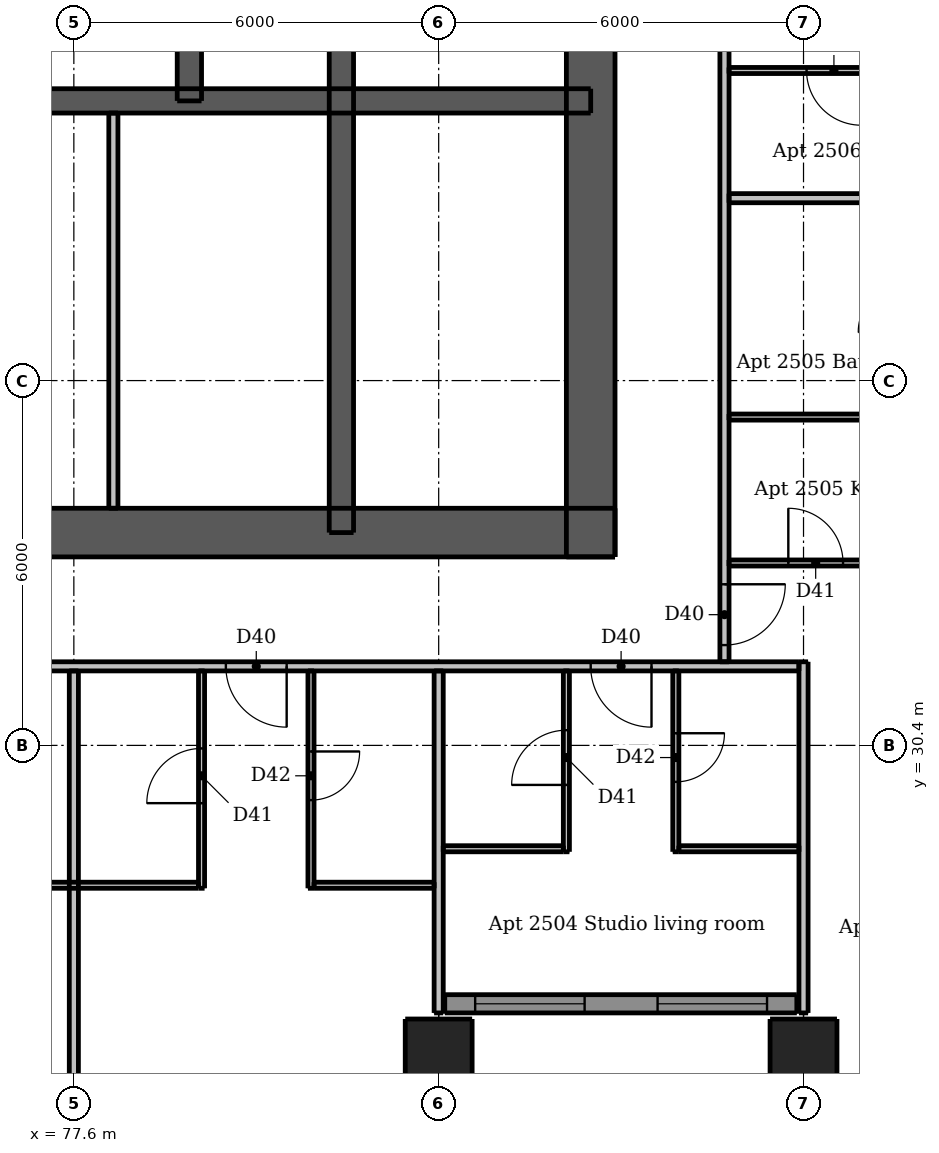
"""IFC4 building model, lengths in metres.
Left out: names, types, materials, properties, quantities, classifications, styles, units other than length and angle.
Written with IfcOpenShell. Run it as: python <this file> out.ifc"""

import sys

from ifc_helpers import new_model, si_unit, direction, frame, frame_2d, origin, origin_2d, place, context, subcontext, project, spatial, rectangle, extrude, element, fill, save


model = new_model("IFC4")
c1 = context("Model", 3, precision=1e-05, world=origin(), true_north=direction((0.0, 1.0)))
c2 = subcontext(c1, "Body", "Model", "MODEL_VIEW")
j1 = project(units=[si_unit("LENGTHUNIT", "METRE"), si_unit("PLANEANGLEUNIT", "RADIAN")], contexts=[c1])
p1 = place(None, origin())
s1 = spatial("IfcSite", under=j1, at=p1, CompositionType="ELEMENT")
p2 = place(p1, origin())
s2 = spatial("IfcBuilding", under=s1, at=p2, CompositionType="ELEMENT")
p3 = place(p2, frame((0.0, 0.0, 95.2)))
s3 = spatial("IfcBuildingStorey", under=s2, at=p3, CompositionType="ELEMENT", Elevation=95.2)
p4 = place(p3, frame((62.5, 33.9, 0.0), z_axis=(0.0, 0.0, 1.0), x_axis=(1.0, 0.0, 0.0)))
e1 = element("IfcWall", 1, at=p4, inside=s3, PredefinedType="SHEAR", context=c2, shape_type="SweptSolid", body=[
    extrude(rectangle(XDim=24.0, YDim=0.8, at=frame_2d((12.0, 0.0))), origin(), (0.0, 0.0, 1.0), 3.05),
])
p5 = place(p4, frame((2.0, 0.0, 0.0)))
e2 = element("IfcOpeningElement", 2, at=p5, cuts=e1, PredefinedType="OPENING", context=c2, shape_type="SweptSolid", body=[
    extrude(rectangle(XDim=1.1, YDim=2.1, at=frame_2d((0.55, 1.05))), frame((0.0, 0.41, 0.0), z_axis=(0.0, -1.0, 0.0), x_axis=(1.0, 0.0, 0.0)), (0.0, 0.0, 1.0), 0.82),
])
p6 = place(p4, frame((20.9, 0.0, 0.0)))
e3 = element("IfcOpeningElement", 3, at=p6, cuts=e1, PredefinedType="OPENING", context=c2, shape_type="SweptSolid", body=[
    extrude(rectangle(XDim=1.1, YDim=2.1, at=frame_2d((0.55, 1.05))), frame((0.0, 0.41, 0.0), z_axis=(0.0, -1.0, 0.0), x_axis=(1.0, 0.0, 0.0)), (0.0, 0.0, 1.0), 0.82),
])
p7 = place(p4, frame((8.0, 0.0, 0.0)))
e4 = element("IfcOpeningElement", 4, at=p7, cuts=e1, PredefinedType="OPENING", context=c2, shape_type="SweptSolid", body=[
    extrude(rectangle(XDim=1.1, YDim=2.1, at=frame_2d((0.55, 1.05))), frame((0.0, 0.41, 0.0), z_axis=(0.0, -1.0, 0.0), x_axis=(1.0, 0.0, 0.0)), (0.0, 0.0, 1.0), 0.82),
])
p8 = place(p4, frame((13.525, 0.0, 0.0)))
e5 = element("IfcOpeningElement", 5, at=p8, cuts=e1, PredefinedType="OPENING", context=c2, shape_type="SweptSolid", body=[
    extrude(rectangle(XDim=0.9, YDim=2.1, at=frame_2d((0.45, 1.05))), frame((0.0, 0.41, 0.0), z_axis=(0.0, -1.0, 0.0), x_axis=(1.0, 0.0, 0.0)), (0.0, 0.0, 1.0), 0.82),
])
p9 = place(p4, frame((17.075, 0.0, 0.0)))
e6 = element("IfcOpeningElement", 6, at=p9, cuts=e1, PredefinedType="OPENING", context=c2, shape_type="SweptSolid", body=[
    extrude(rectangle(XDim=0.9, YDim=2.1, at=frame_2d((0.45, 1.05))), frame((0.0, 0.41, 0.0), z_axis=(0.0, -1.0, 0.0), x_axis=(1.0, 0.0, 0.0)), (0.0, 0.0, 1.0), 0.82),
])
p10 = place(p3, frame((86.1, 33.5, 0.0), z_axis=(0.0, 0.0, 1.0), x_axis=(0.0, 1.0, 0.0)))
e7 = element("IfcWall", 7, at=p10, inside=s3, PredefinedType="SHEAR", context=c2, shape_type="SweptSolid", body=[
    extrude(rectangle(XDim=24.0, YDim=0.8, at=frame_2d((12.0, 0.0))), origin(), (0.0, 0.0, 1.0), 3.05),
])
p11 = place(p10, frame((11.2, 0.0, 0.0)))
e8 = element("IfcOpeningElement", 8, at=p11, cuts=e7, PredefinedType="OPENING", context=c2, shape_type="SweptSolid", body=[
    extrude(rectangle(XDim=1.6, YDim=2.1, at=frame_2d((0.8, 1.05))), frame((0.0, 0.41, 0.0), z_axis=(0.0, -1.0, 0.0), x_axis=(1.0, 0.0, 0.0)), (0.0, 0.0, 1.0), 0.82),
])
p12 = place(p3, frame((62.9, 41.0, 0.0), z_axis=(0.0, 0.0, 1.0), x_axis=(1.0, 0.0, 0.0)))
e9 = element("IfcWall", 9, at=p12, inside=s3, PredefinedType="SHEAR", context=c2, shape_type="SweptSolid", body=[
    extrude(rectangle(XDim=23.2, YDim=0.4, at=frame_2d((11.6, 0.0))), origin(), (0.0, 0.0, 1.0), 3.05),
])
p13 = place(p3, frame((82.0, 33.9, 0.0), z_axis=(0.0, 0.0, 1.0), x_axis=(0.0, 1.0, 0.0)))
e10 = element("IfcWall", 10, at=p13, inside=s3, PredefinedType="SHEAR", context=c2, shape_type="SweptSolid", body=[
    extrude(rectangle(XDim=10.0, YDim=0.4, at=frame_2d((5.0, 0.0))), origin(), (0.0, 0.0, 1.0), 3.05),
])
p14 = place(p3, frame((79.5, 41.0, 0.0), z_axis=(0.0, 0.0, 1.0), x_axis=(0.0, 1.0, 0.0)))
e11 = element("IfcWall", 11, at=p14, inside=s3, PredefinedType="SHEAR", context=c2, shape_type="SweptSolid", body=[
    extrude(rectangle(XDim=2.9, YDim=0.4, at=frame_2d((1.45, 0.0))), origin(), (0.0, 0.0, 1.0), 3.05),
])
for number, where, z_axis, x_axis in (
    (12, (83.6, 25.35, 0.0), (0.0, 0.0, 1.0), (1.0, 0.0, 0.0)),
    (13, (89.6, 25.35, 0.0), (0.0, 0.0, 1.0), (1.0, 0.0, 0.0)),
):
    element("IfcColumn", number, at=place(p3, frame(where, z_axis=z_axis, x_axis=x_axis)), inside=s3, PredefinedType="COLUMN", context=c2, shape_type="SweptSolid", body=[
        extrude(rectangle(XDim=1.1, YDim=1.1, at=origin_2d()), origin(), (0.0, 0.0, 1.0), 3.05),
    ])
p15 = place(p3, frame((83.7, 26.15, 0.0), z_axis=(0.0, 0.0, 1.0), x_axis=(1.0, 0.0, 0.0)))
e14 = element("IfcWall", 14, at=p15, inside=s3, PredefinedType="SOLIDWALL", context=c2, shape_type="SweptSolid", body=[
    extrude(rectangle(XDim=5.79, YDim=0.3, at=frame_2d((2.895, 0.0))), origin(), (0.0, 0.0, 1.0), 3.05),
])
p16 = place(p15, frame((0.5, 0.0, 0.15)))
e15 = element("IfcOpeningElement", 15, at=p16, cuts=e14, PredefinedType="OPENING", context=c2, shape_type="SweptSolid", body=[
    extrude(rectangle(XDim=1.8, YDim=2.1, at=frame_2d((0.9, 1.05))), frame((0.0, 0.16, 0.0), z_axis=(0.0, -1.0, 0.0), x_axis=(1.0, 0.0, 0.0)), (0.0, 0.0, 1.0), 0.32),
])
p17 = place(p15, frame((3.5, 0.0, 0.15)))
e16 = element("IfcOpeningElement", 16, at=p17, cuts=e14, PredefinedType="OPENING", context=c2, shape_type="SweptSolid", body=[
    extrude(rectangle(XDim=1.8, YDim=2.1, at=frame_2d((0.9, 1.05))), frame((0.0, 0.16, 0.0), z_axis=(0.0, -1.0, 0.0), x_axis=(1.0, 0.0, 0.0)), (0.0, 0.0, 1.0), 0.32),
])
p18 = place(p3, frame((78.25, 34.3, 0.0), z_axis=(0.0, 0.0, 1.0), x_axis=(0.0, 1.0, 0.0)))
e17 = element("IfcWall", 17, at=p18, inside=s3, PredefinedType="PLUMBINGWALL", context=c2, shape_type="SweptSolid", body=[
    extrude(rectangle(XDim=6.5, YDim=0.15, at=frame_2d((3.25, 0.0))), origin(), (0.0, 0.0, 1.0), 3.05),
])
p19 = place(p3, frame((79.7, 28.05, 0.0), z_axis=(0.0, 0.0, 1.0), x_axis=(0.0, 1.0, 0.0)))
e18 = element("IfcWall", 18, at=p19, inside=s3, PredefinedType="PARTITIONING", context=c2, shape_type="SweptSolid", body=[
    extrude(rectangle(XDim=3.575, YDim=0.1, at=frame_2d((1.788, 0.0))), origin(), (0.0, 0.0, 1.0), 3.05),
])
p20 = place(p19, frame((1.4, 0.0, 0.0)))
e19 = element("IfcOpeningElement", 19, at=p20, cuts=e18, PredefinedType="OPENING", context=c2, shape_type="SweptSolid", body=[
    extrude(rectangle(XDim=0.9, YDim=2.1, at=frame_2d((0.45, 1.05))), frame((0.0, 0.06, 0.0), z_axis=(0.0, -1.0, 0.0), x_axis=(1.0, 0.0, 0.0)), (0.0, 0.0, 1.0), 0.12),
])
p21 = place(p3, frame((81.5, 31.625, 0.0), z_axis=(0.0, 0.0, 1.0), x_axis=(0.0, -1.0, 0.0)))
e20 = element("IfcWall", 20, at=p21, inside=s3, PredefinedType="PARTITIONING", context=c2, shape_type="SweptSolid", body=[
    extrude(rectangle(XDim=3.575, YDim=0.1, at=frame_2d((1.788, 0.0))), origin(), (0.0, 0.0, 1.0), 3.05),
])
p22 = place(p21, frame((1.325, 0.0, 0.0)))
e21 = element("IfcOpeningElement", 21, at=p22, cuts=e20, PredefinedType="OPENING", context=c2, shape_type="SweptSolid", body=[
    extrude(rectangle(XDim=0.8, YDim=2.1, at=frame_2d((0.4, 1.05))), frame((0.0, 0.06, 0.0), z_axis=(0.0, -1.0, 0.0), x_axis=(1.0, 0.0, 0.0)), (0.0, 0.0, 1.0), 0.12),
])
p23 = place(p3, frame((85.7, 28.65, 0.0), z_axis=(0.0, 0.0, 1.0), x_axis=(0.0, 1.0, 0.0)))
e22 = element("IfcWall", 22, at=p23, inside=s3, PredefinedType="PARTITIONING", context=c2, shape_type="SweptSolid", body=[
    extrude(rectangle(XDim=2.975, YDim=0.1, at=frame_2d((1.488, 0.0))), origin(), (0.0, 0.0, 1.0), 3.05),
])
p24 = place(p23, frame((1.1, 0.0, 0.0)))
e23 = element("IfcOpeningElement", 23, at=p24, cuts=e22, PredefinedType="OPENING", context=c2, shape_type="SweptSolid", body=[
    extrude(rectangle(XDim=0.9, YDim=2.1, at=frame_2d((0.45, 1.05))), frame((0.0, 0.06, 0.0), z_axis=(0.0, -1.0, 0.0), x_axis=(1.0, 0.0, 0.0)), (0.0, 0.0, 1.0), 0.12),
])
p25 = place(p3, frame((87.5, 31.625, 0.0), z_axis=(0.0, 0.0, 1.0), x_axis=(0.0, -1.0, 0.0)))
e24 = element("IfcWall", 24, at=p25, inside=s3, PredefinedType="PARTITIONING", context=c2, shape_type="SweptSolid", body=[
    extrude(rectangle(XDim=2.975, YDim=0.1, at=frame_2d((1.488, 0.0))), origin(), (0.0, 0.0, 1.0), 3.05),
])
p26 = place(p25, frame((1.025, 0.0, 0.0)))
e25 = element("IfcOpeningElement", 25, at=p26, cuts=e24, PredefinedType="OPENING", context=c2, shape_type="SweptSolid", body=[
    extrude(rectangle(XDim=0.8, YDim=2.1, at=frame_2d((0.4, 1.05))), frame((0.0, 0.06, 0.0), z_axis=(0.0, -1.0, 0.0), x_axis=(1.0, 0.0, 0.0)), (0.0, 0.0, 1.0), 0.12),
])
p27 = place(p3, frame((91.85, 41.5, 0.0), z_axis=(0.0, 0.0, 1.0), x_axis=(-1.0, 0.0, 0.0)))
e26 = element("IfcWall", 26, at=p27, inside=s3, PredefinedType="PARTITIONING", context=c2, shape_type="SweptSolid", body=[
    extrude(rectangle(XDim=3.475, YDim=0.1, at=frame_2d((1.738, 0.0))), origin(), (0.0, 0.0, 1.0), 3.05),
])
p28 = place(p27, frame((1.3, 0.0, 0.0)))
e27 = element("IfcOpeningElement", 27, at=p28, cuts=e26, PredefinedType="OPENING", context=c2, shape_type="SweptSolid", body=[
    extrude(rectangle(XDim=0.9, YDim=2.1, at=frame_2d((0.45, 1.05))), frame((0.0, 0.06, 0.0), z_axis=(0.0, -1.0, 0.0), x_axis=(1.0, 0.0, 0.0)), (0.0, 0.0, 1.0), 0.12),
])
p29 = place(p3, frame((88.375, 35.8, 0.0), z_axis=(0.0, 0.0, 1.0), x_axis=(1.0, 0.0, 0.0)))
e28 = element("IfcWall", 28, at=p29, inside=s3, PredefinedType="PARTITIONING", context=c2, shape_type="SweptSolid", body=[
    extrude(rectangle(XDim=2.875, YDim=0.1, at=frame_2d((1.438, 0.0))), origin(), (0.0, 0.0, 1.0), 3.05),
])
p30 = place(p3, frame((88.375, 33.4, 0.0), z_axis=(0.0, 0.0, 1.0), x_axis=(1.0, 0.0, 0.0)))
e29 = element("IfcWall", 29, at=p30, inside=s3, PredefinedType="PARTITIONING", context=c2, shape_type="SweptSolid", body=[
    extrude(rectangle(XDim=5.625, YDim=0.1, at=frame_2d((2.812, 0.0))), origin(), (0.0, 0.0, 1.0), 3.05),
])
p31 = place(p30, frame((0.975, 0.0, 0.0)))
e30 = element("IfcOpeningElement", 30, at=p31, cuts=e29, PredefinedType="OPENING", context=c2, shape_type="SweptSolid", body=[
    extrude(rectangle(XDim=0.9, YDim=2.1, at=frame_2d((0.45, 1.05))), frame((0.0, 0.06, 0.0), z_axis=(0.0, -1.0, 0.0), x_axis=(1.0, 0.0, 0.0)), (0.0, 0.0, 1.0), 0.12),
])
p32 = place(p30, frame((3.825, 0.0, 0.0)))
e31 = element("IfcOpeningElement", 31, at=p32, cuts=e29, PredefinedType="OPENING", context=c2, shape_type="SweptSolid", body=[
    extrude(rectangle(XDim=0.9, YDim=2.1, at=frame_2d((0.45, 1.05))), frame((0.0, 0.06, 0.0), z_axis=(0.0, -1.0, 0.0), x_axis=(1.0, 0.0, 0.0)), (0.0, 0.0, 1.0), 0.12),
])
for number, where, z_axis, x_axis in (
    (32, (83.675, 28.7, 0.0), (0.0, 0.0, 1.0), (1.0, 0.0, 0.0)),
    (33, (87.55, 28.7, 0.0), (0.0, 0.0, 1.0), (1.0, 0.0, 0.0)),
):
    element("IfcWall", number, at=place(p3, frame(where, z_axis=z_axis, x_axis=x_axis)), inside=s3, PredefinedType="PARTITIONING", context=c2, shape_type="SweptSolid", body=[
        extrude(rectangle(XDim=1.975, YDim=0.1, at=frame_2d((0.987, 0.0))), origin(), (0.0, 0.0, 1.0), 3.05),
    ])
p33 = place(p3, frame((75.55, 28.1, 0.0), z_axis=(0.0, 0.0, 1.0), x_axis=(1.0, 0.0, 0.0)))
e34 = element("IfcWall", 34, at=p33, inside=s3, PredefinedType="PARTITIONING", context=c2, shape_type="SweptSolid", body=[
    extrude(rectangle(XDim=4.1, YDim=0.1, at=frame_2d((2.05, 0.0))), origin(), (0.0, 0.0, 1.0), 3.05),
])
p34 = place(p3, frame((81.55, 28.1, 0.0), z_axis=(0.0, 0.0, 1.0), x_axis=(1.0, 0.0, 0.0)))
e35 = element("IfcWall", 35, at=p34, inside=s3, PredefinedType="PARTITIONING", context=c2, shape_type="SweptSolid", body=[
    extrude(rectangle(XDim=1.975, YDim=0.1, at=frame_2d((0.987, 0.0))), origin(), (0.0, 0.0, 1.0), 3.05),
])
p35 = place(p3, frame((77.6, 23.0, 0.0), z_axis=(0.0, 0.0, 1.0), x_axis=(0.0, 1.0, 0.0)))
e36 = element("IfcWall", 36, at=p35, inside=s3, PredefinedType="PARTITIONING", context=c2, shape_type="SweptSolid", body=[
    extrude(rectangle(XDim=8.625, YDim=0.15, at=frame_2d((4.312, 0.0))), origin(), (0.0, 0.0, 1.0), 2.516),
])
p36 = place(p3, frame((83.6, 26.0, 0.0), z_axis=(0.0, 0.0, 1.0), x_axis=(0.0, 1.0, 0.0)))
e37 = element("IfcWall", 37, at=p36, inside=s3, PredefinedType="PARTITIONING", context=c2, shape_type="SweptSolid", body=[
    extrude(rectangle(XDim=5.625, YDim=0.15, at=frame_2d((2.812, 0.0))), origin(), (0.0, 0.0, 1.0), 2.589),
])
p37 = place(p3, frame((88.3, 60.475, 0.0), z_axis=(0.0, 0.0, 1.0), x_axis=(0.0, -1.0, 0.0)))
e38 = element("IfcWall", 38, at=p37, inside=s3, PredefinedType="PARTITIONING", context=c2, shape_type="SweptSolid", body=[
    extrude(rectangle(XDim=28.7, YDim=0.15, at=frame_2d((14.35, 0.0))), origin(), (0.0, 0.0, 1.0), 3.05),
])
p38 = place(p37, frame((27.425, 0.0, 0.0)))
e39 = element("IfcOpeningElement", 39, at=p38, cuts=e38, PredefinedType="OPENING", context=c2, shape_type="SweptSolid", body=[
    extrude(rectangle(XDim=1.0, YDim=2.1, at=frame_2d((0.5, 1.05))), frame((0.0, 0.085, 0.0), z_axis=(0.0, -1.0, 0.0), x_axis=(1.0, 0.0, 0.0)), (0.0, 0.0, 1.0), 0.17),
])
p39 = place(p37, frame((17.575, 0.0, 0.0)))
e40 = element("IfcOpeningElement", 40, at=p39, cuts=e38, PredefinedType="OPENING", context=c2, shape_type="SweptSolid", body=[
    extrude(rectangle(XDim=1.0, YDim=2.1, at=frame_2d((0.5, 1.05))), frame((0.0, 0.085, 0.0), z_axis=(0.0, -1.0, 0.0), x_axis=(1.0, 0.0, 0.0)), (0.0, 0.0, 1.0), 0.17),
])
p40 = place(p37, frame((11.575, 0.0, 0.0)))
e41 = element("IfcOpeningElement", 41, at=p40, cuts=e38, PredefinedType="OPENING", context=c2, shape_type="SweptSolid", body=[
    extrude(rectangle(XDim=1.0, YDim=2.1, at=frame_2d((0.5, 1.05))), frame((0.0, 0.085, 0.0), z_axis=(0.0, -1.0, 0.0), x_axis=(1.0, 0.0, 0.0)), (0.0, 0.0, 1.0), 0.17),
])
p41 = place(p37, frame((3.775, 0.0, 0.0)))
e42 = element("IfcOpeningElement", 42, at=p41, cuts=e38, PredefinedType="OPENING", context=c2, shape_type="SweptSolid", body=[
    extrude(rectangle(XDim=1.0, YDim=2.1, at=frame_2d((0.5, 1.05))), frame((0.0, 0.085, 0.0), z_axis=(0.0, -1.0, 0.0), x_axis=(1.0, 0.0, 0.0)), (0.0, 0.0, 1.0), 0.17),
])
p42 = place(p3, frame((89.6, 26.0, 0.0), z_axis=(0.0, 0.0, 1.0), x_axis=(0.0, 1.0, 0.0)))
e43 = element("IfcWall", 43, at=p42, inside=s3, PredefinedType="PARTITIONING", context=c2, shape_type="SweptSolid", body=[
    extrude(rectangle(XDim=5.775, YDim=0.15, at=frame_2d((2.887, 0.0))), origin(), (0.0, 0.0, 1.0), 2.516),
])
p43 = place(p3, frame((88.375, 39.4, 0.0), z_axis=(0.0, 0.0, 1.0), x_axis=(1.0, 0.0, 0.0)))
e44 = element("IfcWall", 44, at=p43, inside=s3, PredefinedType="PARTITIONING", context=c2, shape_type="SweptSolid", body=[
    extrude(rectangle(XDim=10.125, YDim=0.15, at=frame_2d((5.062, 0.0))), origin(), (0.0, 0.0, 1.0), 3.05),
])
p44 = place(p3, frame((89.525, 31.7, 0.0), z_axis=(0.0, 0.0, 1.0), x_axis=(-1.0, 0.0, 0.0)))
e45 = element("IfcWall", 45, at=p44, inside=s3, PredefinedType="PARTITIONING", context=c2, shape_type="SweptSolid", body=[
    extrude(rectangle(XDim=28.75, YDim=0.15, at=frame_2d((14.375, 0.0))), origin(), (0.0, 0.0, 1.0), 3.05),
])
p45 = place(p44, frame((25.875, 0.0, 0.0)))
e46 = element("IfcOpeningElement", 46, at=p45, cuts=e45, PredefinedType="OPENING", context=c2, shape_type="SweptSolid", body=[
    extrude(rectangle(XDim=1.0, YDim=2.1, at=frame_2d((0.5, 1.05))), frame((0.0, 0.085, 0.0), z_axis=(0.0, -1.0, 0.0), x_axis=(1.0, 0.0, 0.0)), (0.0, 0.0, 1.0), 0.17),
])
p46 = place(p44, frame((14.425, 0.0, 0.0)))
e47 = element("IfcOpeningElement", 47, at=p46, cuts=e45, PredefinedType="OPENING", context=c2, shape_type="SweptSolid", body=[
    extrude(rectangle(XDim=1.0, YDim=2.1, at=frame_2d((0.5, 1.05))), frame((0.0, 0.085, 0.0), z_axis=(0.0, -1.0, 0.0), x_axis=(1.0, 0.0, 0.0)), (0.0, 0.0, 1.0), 0.17),
])
p47 = place(p44, frame((8.425, 0.0, 0.0)))
e48 = element("IfcOpeningElement", 48, at=p47, cuts=e45, PredefinedType="OPENING", context=c2, shape_type="SweptSolid", body=[
    extrude(rectangle(XDim=1.0, YDim=2.1, at=frame_2d((0.5, 1.05))), frame((0.0, 0.085, 0.0), z_axis=(0.0, -1.0, 0.0), x_axis=(1.0, 0.0, 0.0)), (0.0, 0.0, 1.0), 0.17),
])
p48 = place(p44, frame((2.425, 0.0, 0.0)))
e49 = element("IfcOpeningElement", 49, at=p48, cuts=e45, PredefinedType="OPENING", context=c2, shape_type="SweptSolid", body=[
    extrude(rectangle(XDim=1.0, YDim=2.1, at=frame_2d((0.5, 1.05))), frame((0.0, 0.085, 0.0), z_axis=(0.0, -1.0, 0.0), x_axis=(1.0, 0.0, 0.0)), (0.0, 0.0, 1.0), 0.17),
])
p49 = place(p16, origin())
e50 = element("IfcWindow", 50, at=p49, inside=s3, PartitioningType="DOUBLE_PANEL_VERTICAL", PredefinedType="WINDOW", context=c2, shape_type="SweptSolid", body=[
    extrude(rectangle(XDim=1.8, YDim=2.1, at=frame_2d((0.9, 1.05))), frame((0.0, 0.03, 0.0), z_axis=(0.0, -1.0, 0.0), x_axis=(1.0, 0.0, 0.0)), (0.0, 0.0, 1.0), 0.06),
])
fill(e15, e50)
p50 = place(p17, origin())
e51 = element("IfcWindow", 51, at=p50, inside=s3, PartitioningType="DOUBLE_PANEL_VERTICAL", PredefinedType="WINDOW", context=c2, shape_type="SweptSolid", body=[
    extrude(rectangle(XDim=1.8, YDim=2.1, at=frame_2d((0.9, 1.05))), frame((0.0, 0.03, 0.0), z_axis=(0.0, -1.0, 0.0), x_axis=(1.0, 0.0, 0.0)), (0.0, 0.0, 1.0), 0.06),
])
fill(e16, e51)
p51 = place(p6, origin())
e52 = element("IfcDoor", 52, at=p51, inside=s3, OperationType="SINGLE_SWING_RIGHT", PredefinedType="DOOR", context=c2, shape_type="SweptSolid", body=[
    extrude(rectangle(XDim=1.1, YDim=2.1, at=frame_2d((0.55, 1.05))), frame((0.0, 0.388, 0.0), z_axis=(0.0, -1.0, 0.0), x_axis=(1.0, 0.0, 0.0)), (0.0, 0.0, 1.0), 0.05),
])
fill(e3, e52)
p52 = place(p9, origin())
e53 = element("IfcDoor", 53, at=p52, inside=s3, OperationType="SINGLE_SWING_LEFT", PredefinedType="DOOR", context=c2, shape_type="SweptSolid", body=[
    extrude(rectangle(XDim=0.9, YDim=2.1, at=frame_2d((0.45, 1.05))), frame((0.0, 0.388, 0.0), z_axis=(0.0, -1.0, 0.0), x_axis=(1.0, 0.0, 0.0)), (0.0, 0.0, 1.0), 0.05),
])
fill(e6, e53)
p53 = place(p47, origin())
e54 = element("IfcDoor", 54, at=p53, inside=s3, OperationType="SINGLE_SWING_LEFT", PredefinedType="DOOR", context=c2, shape_type="SweptSolid", body=[
    extrude(rectangle(XDim=1.0, YDim=2.1, at=frame_2d((0.5, 1.05))), frame((0.0, 0.025, 0.0), z_axis=(0.0, -1.0, 0.0), x_axis=(1.0, 0.0, 0.0)), (0.0, 0.0, 1.0), 0.05),
])
fill(e48, e54)
p54 = place(p20, origin())
e55 = element("IfcDoor", 55, at=p54, inside=s3, OperationType="SINGLE_SWING_LEFT", PredefinedType="DOOR", context=c2, shape_type="SweptSolid", body=[
    extrude(rectangle(XDim=0.9, YDim=2.1, at=frame_2d((0.45, 1.05))), frame((0.0, 0.025, 0.0), z_axis=(0.0, -1.0, 0.0), x_axis=(1.0, 0.0, 0.0)), (0.0, 0.0, 1.0), 0.05),
])
fill(e19, e55)
p55 = place(p22, origin())
e56 = element("IfcDoor", 56, at=p55, inside=s3, OperationType="SINGLE_SWING_LEFT", PredefinedType="DOOR", context=c2, shape_type="SweptSolid", body=[
    extrude(rectangle(XDim=0.8, YDim=2.1, at=frame_2d((0.4, 1.05))), frame((0.0, 0.025, 0.0), z_axis=(0.0, -1.0, 0.0), x_axis=(1.0, 0.0, 0.0)), (0.0, 0.0, 1.0), 0.05),
])
fill(e21, e56)
p56 = place(p48, origin())
e57 = element("IfcDoor", 57, at=p56, inside=s3, OperationType="SINGLE_SWING_LEFT", PredefinedType="DOOR", context=c2, shape_type="SweptSolid", body=[
    extrude(rectangle(XDim=1.0, YDim=2.1, at=frame_2d((0.5, 1.05))), frame((0.0, 0.025, 0.0), z_axis=(0.0, -1.0, 0.0), x_axis=(1.0, 0.0, 0.0)), (0.0, 0.0, 1.0), 0.05),
])
fill(e49, e57)
p57 = place(p24, origin())
e58 = element("IfcDoor", 58, at=p57, inside=s3, OperationType="SINGLE_SWING_LEFT", PredefinedType="DOOR", context=c2, shape_type="SweptSolid", body=[
    extrude(rectangle(XDim=0.9, YDim=2.1, at=frame_2d((0.45, 1.05))), frame((0.0, 0.025, 0.0), z_axis=(0.0, -1.0, 0.0), x_axis=(1.0, 0.0, 0.0)), (0.0, 0.0, 1.0), 0.05),
])
fill(e23, e58)
p58 = place(p26, origin())
e59 = element("IfcDoor", 59, at=p58, inside=s3, OperationType="SINGLE_SWING_LEFT", PredefinedType="DOOR", context=c2, shape_type="SweptSolid", body=[
    extrude(rectangle(XDim=0.8, YDim=2.1, at=frame_2d((0.4, 1.05))), frame((0.0, 0.025, 0.0), z_axis=(0.0, -1.0, 0.0), x_axis=(1.0, 0.0, 0.0)), (0.0, 0.0, 1.0), 0.05),
])
fill(e25, e59)
p59 = place(p38, origin())
e60 = element("IfcDoor", 60, at=p59, inside=s3, OperationType="SINGLE_SWING_LEFT", PredefinedType="DOOR", context=c2, shape_type="SweptSolid", body=[
    extrude(rectangle(XDim=1.0, YDim=2.1, at=frame_2d((0.5, 1.05))), frame((0.0, 0.025, 0.0), z_axis=(0.0, -1.0, 0.0), x_axis=(1.0, 0.0, 0.0)), (0.0, 0.0, 1.0), 0.05),
])
fill(e39, e60)
p60 = place(p31, origin())
e61 = element("IfcDoor", 61, at=p60, inside=s3, OperationType="SINGLE_SWING_LEFT", PredefinedType="DOOR", context=c2, shape_type="SweptSolid", body=[
    extrude(rectangle(XDim=0.9, YDim=2.1, at=frame_2d((0.45, 1.05))), frame((0.0, 0.025, 0.0), z_axis=(0.0, -1.0, 0.0), x_axis=(1.0, 0.0, 0.0)), (0.0, 0.0, 1.0), 0.05),
])
fill(e30, e61)
p61 = place(p28, origin())
e62 = element("IfcDoor", 62, at=p61, inside=s3, OperationType="SINGLE_SWING_LEFT", PredefinedType="DOOR", context=c2, shape_type="SweptSolid", body=[
    extrude(rectangle(XDim=0.9, YDim=2.1, at=frame_2d((0.45, 1.05))), frame((0.0, 0.025, 0.0), z_axis=(0.0, -1.0, 0.0), x_axis=(1.0, 0.0, 0.0)), (0.0, 0.0, 1.0), 0.05),
])
fill(e27, e62)
save(model, sys.argv[1])
